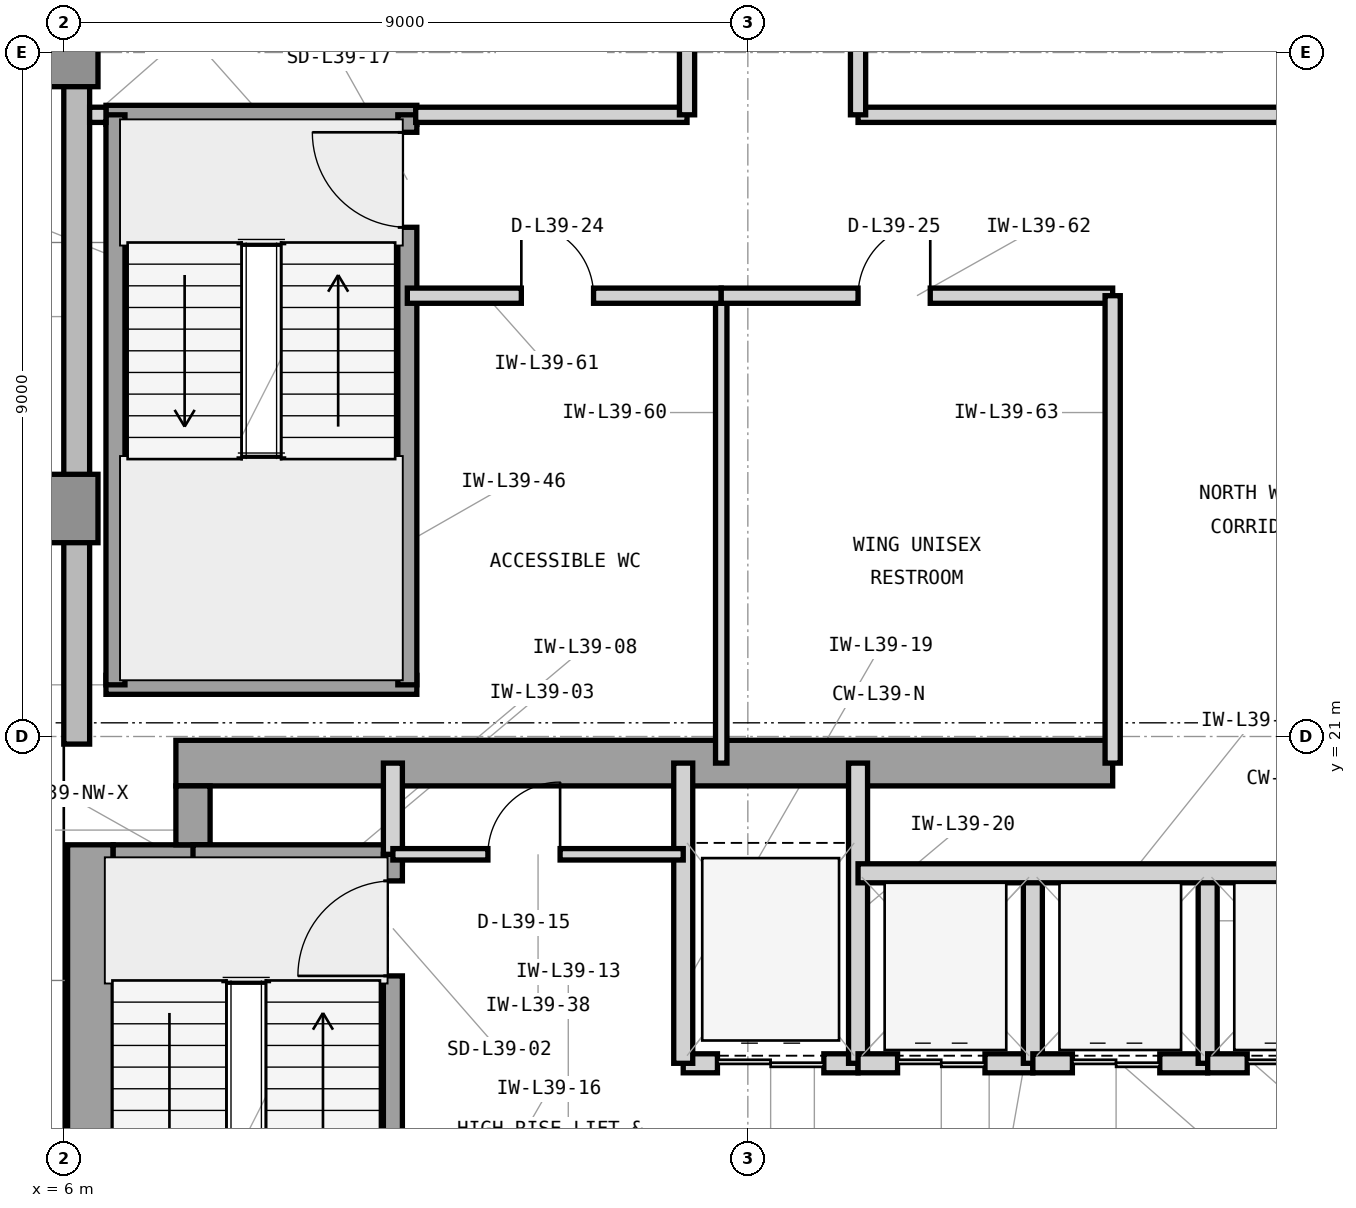
"""IFC4 building model, lengths in metres.
Left out: names, types, materials, properties, quantities, classifications, styles, units other than length and angle.
Written with IfcOpenShell. Run it as: python <this file> out.ifc"""

import sys

from ifc_helpers import new_model, si_unit, direction, frame, frame_2d, origin, origin_2d, place, context, subcontext, project, spatial, rectangle, extrude, element, fill, save


model = new_model("IFC4")
c1 = context("Model", 3, precision=1e-05, world=origin(), true_north=direction((0.0, 1.0)))
c2 = subcontext(c1, "Body", "Model", "MODEL_VIEW")
j1 = project(units=[si_unit("LENGTHUNIT", "METRE"), si_unit("PLANEANGLEUNIT", "RADIAN")], contexts=[c1])
p1 = place(None, origin())
s1 = spatial("IfcSite", under=j1, at=p1, CompositionType="ELEMENT")
p2 = place(p1, origin())
s2 = spatial("IfcBuilding", under=s1, at=p2, CompositionType="ELEMENT")
p3 = place(p2, frame((0.0, 0.0, 164.4)))
s3 = spatial("IfcBuildingStorey", under=s2, at=p3, CompositionType="ELEMENT", Elevation=164.4)
p4 = place(p3, frame((6.35, 4.425, 0.0), z_axis=(0.0, 0.0, 1.0), x_axis=(0.0, 1.0, 0.0)))
e1 = element("IfcWall", 1, at=p4, inside=s3, PredefinedType="SHEAR", context=c2, shape_type="SweptSolid", body=[
    extrude(rectangle(XDim=15.15, YDim=0.6, at=frame_2d((7.575, 0.0))), origin(), (0.0, 0.0, 1.0), 3.9),
])
p5 = place(p3, frame((7.475, 20.65, 0.0), z_axis=(0.0, 0.0, 1.0), x_axis=(1.0, 0.0, 0.0)))
e2 = element("IfcWall", 2, at=p5, inside=s3, PredefinedType="SHEAR", context=c2, shape_type="SweptSolid", body=[
    extrude(rectangle(XDim=12.325, YDim=0.6, at=frame_2d((6.163, 0.0))), origin(), (0.0, 0.0, 1.0), 3.9),
])
p6 = place(p3, frame((6.65, 19.35, 0.0), z_axis=(0.0, 0.0, 1.0), x_axis=(1.0, 0.0, 0.0)))
e3 = element("IfcWall", 3, at=p6, inside=s3, PredefinedType="SHEAR", context=c2, shape_type="SweptSolid", body=[
    extrude(rectangle(XDim=1.275, YDim=0.45, at=frame_2d((0.638, 0.0))), origin(), (0.0, 0.0, 1.0), 3.9),
])
p7 = place(p3, frame((7.7, 19.575, 0.0), z_axis=(0.0, 0.0, 1.0), x_axis=(0.0, 1.0, 0.0)))
e4 = element("IfcWall", 4, at=p7, inside=s3, PredefinedType="SHEAR", context=c2, shape_type="SweptSolid", body=[
    extrude(rectangle(XDim=0.775, YDim=0.45, at=frame_2d((0.388, 0.0))), origin(), (0.0, 0.0, 1.0), 3.9),
])
for number, where, z_axis, x_axis in (
    (5, (6.0, 24.0, 0.0), (0.0, 0.0, 1.0), (1.0, 0.0, 0.0)),
    (6, (6.0, 30.0, 0.0), (0.0, 0.0, 1.0), (1.0, 0.0, 0.0)),
):
    element("IfcColumn", number, at=place(p3, frame(where, z_axis=z_axis, x_axis=x_axis)), inside=s3, PredefinedType="COLUMN", context=c2, shape_type="SweptSolid", body=[
        extrude(rectangle(XDim=0.9, YDim=0.9, at=origin_2d()), origin(), (0.0, 0.0, 1.0), 3.9),
    ])
p8 = place(p3, frame((6.17, 43.4, 0.0), z_axis=(0.0, 0.0, 1.0), x_axis=(0.0, -1.0, 0.0)))
e7 = element("IfcWall", 7, at=p8, inside=s3, PredefinedType="STANDARD", context=c2, shape_type="SweptSolid", body=[
    extrude(rectangle(XDim=22.5, YDim=0.34, at=frame_2d((11.25, 0.0))), origin(), (0.0, 0.0, 1.0), 3.7),
])
p9 = place(p8, frame((10.1, 0.0, 0.9)))
e8 = element("IfcOpeningElement", 8, at=p9, cuts=e7, PredefinedType="OPENING", context=c2, shape_type="SweptSolid", body=[
    extrude(rectangle(XDim=2.3, YDim=2.2, at=frame_2d((1.15, 1.1))), frame((0.0, 0.18, 0.0), z_axis=(0.0, -1.0, 0.0), x_axis=(1.0, 0.0, 0.0)), (0.0, 0.0, 1.0), 0.36),
])
p10 = place(p3, frame((7.7, 19.45, 0.0), z_axis=(0.0, 0.0, 1.0), x_axis=(1.0, 0.0, 0.0)))
e9 = element("IfcWall", 9, at=p10, inside=s3, PredefinedType="SHEAR", context=c2, shape_type="SweptSolid", body=[
    extrude(rectangle(XDim=2.755, YDim=0.25, at=frame_2d((1.377, 0.0))), origin(), (0.0, 0.0, 1.0), 3.9),
])
p11 = place(p3, frame((10.33, 12.0, 0.0), z_axis=(0.0, 0.0, 1.0), x_axis=(0.0, 1.0, 0.0)))
e10 = element("IfcWall", 10, at=p11, inside=s3, PredefinedType="SHEAR", context=c2, shape_type="SweptSolid", body=[
    extrude(rectangle(XDim=7.45, YDim=0.25, at=frame_2d((3.725, 0.0))), origin(), (0.0, 0.0, 1.0), 3.9),
])
p12 = place(p11, frame((5.85, 0.0, 0.0)))
e11 = element("IfcOpeningElement", 11, at=p12, cuts=e10, PredefinedType="OPENING", context=c2, shape_type="SweptSolid", body=[
    extrude(rectangle(XDim=1.25, YDim=2.2, at=frame_2d((0.625, 1.1))), frame((0.0, 0.135, 0.0), z_axis=(0.0, -1.0, 0.0), x_axis=(1.0, 0.0, 0.0)), (0.0, 0.0, 1.0), 0.27),
])
p13 = place(p3, frame((10.33, 19.45, 0.0), z_axis=(0.0, 0.0, 1.0), x_axis=(0.0, 1.0, 0.0)))
e12 = element("IfcWall", 12, at=p13, inside=s3, PredefinedType="PARTITIONING", context=c2, shape_type="SweptSolid", body=[
    extrude(rectangle(XDim=1.2, YDim=0.25, at=frame_2d((0.6, 0.0))), origin(), (0.0, 0.0, 1.0), 3.073),
])
p14 = place(p3, frame((14.15, 16.7, 0.0), z_axis=(0.0, 0.0, 1.0), x_axis=(1.0, 0.0, 0.0)))
e13 = element("IfcWall", 13, at=p14, inside=s3, PredefinedType="PARTITIONING", context=c2, shape_type="SweptSolid", body=[
    extrude(rectangle(XDim=2.3, YDim=0.25, at=frame_2d((1.15, 0.0))), origin(), (0.0, 0.0, 1.0), 3.283),
])
p15 = place(p14, frame((0.45, 0.0, 0.0)))
e14 = element("IfcOpeningElement", 14, at=p15, cuts=e13, PredefinedType="OPENING", context=c2, shape_type="SweptSolid", body=[
    extrude(rectangle(XDim=1.4, YDim=2.35, at=frame_2d((0.7, 1.175))), frame((0.0, 0.135, 0.0), z_axis=(0.0, -1.0, 0.0), x_axis=(1.0, 0.0, 0.0)), (0.0, 0.0, 1.0), 0.27),
])
for number, where, z_axis, x_axis in (
    (15, (14.15, 16.7, 0.0), (0.0, 0.0, 1.0), (0.0, 1.0, 0.0)),
    (16, (16.45, 16.7, 0.0), (0.0, 0.0, 1.0), (0.0, 1.0, 0.0)),
):
    element("IfcWall", number, at=place(p3, frame(where, z_axis=z_axis, x_axis=x_axis)), inside=s3, PredefinedType="PARTITIONING", context=c2, shape_type="SweptSolid", body=[
        extrude(rectangle(XDim=3.95, YDim=0.25, at=frame_2d((1.975, 0.0))), origin(), (0.0, 0.0, 1.0), 3.69),
    ])
p16 = place(p3, frame((16.45, 16.7, 0.0), z_axis=(0.0, 0.0, 1.0), x_axis=(1.0, 0.0, 0.0)))
e17 = element("IfcWall", 17, at=p16, inside=s3, PredefinedType="PARTITIONING", context=c2, shape_type="SweptSolid", body=[
    extrude(rectangle(XDim=2.3, YDim=0.25, at=frame_2d((1.15, 0.0))), origin(), (0.0, 0.0, 1.0), 3.283),
])
p17 = place(p16, frame((0.52, 0.0, 0.0)))
e18 = element("IfcOpeningElement", 18, at=p17, cuts=e17, PredefinedType="OPENING", context=c2, shape_type="SweptSolid", body=[
    extrude(rectangle(XDim=1.15, YDim=2.25, at=frame_2d((0.575, 1.125))), frame((0.0, 0.135, 0.0), z_axis=(0.0, -1.0, 0.0), x_axis=(1.0, 0.0, 0.0)), (0.0, 0.0, 1.0), 0.27),
])
p18 = place(p3, frame((18.75, 16.7, 0.0), z_axis=(0.0, 0.0, 1.0), x_axis=(0.0, 1.0, 0.0)))
e19 = element("IfcWall", 19, at=p18, inside=s3, PredefinedType="PARTITIONING", context=c2, shape_type="SweptSolid", body=[
    extrude(rectangle(XDim=2.5, YDim=0.25, at=frame_2d((1.25, 0.0))), origin(), (0.0, 0.0, 1.0), 3.69),
])
p19 = place(p3, frame((18.75, 16.7, 0.0), z_axis=(0.0, 0.0, 1.0), x_axis=(1.0, 0.0, 0.0)))
e20 = element("IfcWall", 20, at=p19, inside=s3, PredefinedType="PARTITIONING", context=c2, shape_type="SweptSolid", body=[
    extrude(rectangle(XDim=2.3, YDim=0.25, at=frame_2d((1.15, 0.0))), origin(), (0.0, 0.0, 1.0), 3.283),
])
p20 = place(p19, frame((0.52, 0.0, 0.0)))
e21 = element("IfcOpeningElement", 21, at=p20, cuts=e20, PredefinedType="OPENING", context=c2, shape_type="SweptSolid", body=[
    extrude(rectangle(XDim=1.15, YDim=2.25, at=frame_2d((0.575, 1.125))), frame((0.0, 0.135, 0.0), z_axis=(0.0, -1.0, 0.0), x_axis=(1.0, 0.0, 0.0)), (0.0, 0.0, 1.0), 0.27),
])
p21 = place(p3, frame((21.05, 16.7, 0.0), z_axis=(0.0, 0.0, 1.0), x_axis=(0.0, 1.0, 0.0)))
e22 = element("IfcWall", 22, at=p21, inside=s3, PredefinedType="PARTITIONING", context=c2, shape_type="SweptSolid", body=[
    extrude(rectangle(XDim=2.5, YDim=0.25, at=frame_2d((1.25, 0.0))), origin(), (0.0, 0.0, 1.0), 3.69),
])
p22 = place(p3, frame((21.05, 16.7, 0.0), z_axis=(0.0, 0.0, 1.0), x_axis=(1.0, 0.0, 0.0)))
e23 = element("IfcWall", 23, at=p22, inside=s3, PredefinedType="PARTITIONING", context=c2, shape_type="SweptSolid", body=[
    extrude(rectangle(XDim=2.4, YDim=0.25, at=frame_2d((1.2, 0.0))), origin(), (0.0, 0.0, 1.0), 3.283),
])
p23 = place(p22, frame((0.52, 0.0, 0.0)))
e24 = element("IfcOpeningElement", 24, at=p23, cuts=e23, PredefinedType="OPENING", context=c2, shape_type="SweptSolid", body=[
    extrude(rectangle(XDim=1.15, YDim=2.25, at=frame_2d((0.575, 1.125))), frame((0.0, 0.135, 0.0), z_axis=(0.0, -1.0, 0.0), x_axis=(1.0, 0.0, 0.0)), (0.0, 0.0, 1.0), 0.27),
])
p24 = place(p3, frame((16.45, 19.2, 0.0), z_axis=(0.0, 0.0, 1.0), x_axis=(1.0, 0.0, 0.0)))
e25 = element("IfcWall", 25, at=p24, inside=s3, PredefinedType="PARTITIONING", context=c2, shape_type="SweptSolid", body=[
    extrude(rectangle(XDim=7.2, YDim=0.25, at=frame_2d((3.6, 0.0))), origin(), (0.0, 0.0, 1.0), 3.69),
])
p25 = place(p3, frame((10.33, 19.45, 0.0), z_axis=(0.0, 0.0, 1.0), x_axis=(1.0, 0.0, 0.0)))
e26 = element("IfcWall", 26, at=p25, inside=s3, PredefinedType="PARTITIONING", context=c2, shape_type="SweptSolid", body=[
    extrude(rectangle(XDim=3.82, YDim=0.15, at=frame_2d((1.91, 0.0))), origin(), (0.0, 0.0, 1.0), 3.69),
])
p26 = place(p25, frame((1.25, 0.0, 0.0)))
e27 = element("IfcOpeningElement", 27, at=p26, cuts=e26, PredefinedType="OPENING", context=c2, shape_type="SweptSolid", body=[
    extrude(rectangle(XDim=0.95, YDim=2.1, at=frame_2d((0.475, 1.05))), frame((0.0, 0.085, 0.0), z_axis=(0.0, -1.0, 0.0), x_axis=(1.0, 0.0, 0.0)), (0.0, 0.0, 1.0), 0.17),
])
for number, where, z_axis, x_axis in (
    (28, (6.555, 21.68, 0.0), (0.0, 0.0, 1.0), (1.0, 0.0, 0.0)),
    (29, (6.555, 29.18, 0.0), (0.0, 0.0, 1.0), (1.0, 0.0, 0.0)),
):
    element("IfcWall", number, at=place(p3, frame(where, z_axis=z_axis, x_axis=x_axis)), inside=s3, PredefinedType="SHEAR", context=c2, shape_type="SweptSolid", body=[
        extrude(rectangle(XDim=4.09, YDim=0.25, at=frame_2d((2.045, 0.0))), origin(), (0.0, 0.0, 1.0), 3.9),
    ])
p27 = place(p3, frame((6.68, 21.68, 0.0), z_axis=(0.0, 0.0, 1.0), x_axis=(0.0, 1.0, 0.0)))
e30 = element("IfcWall", 30, at=p27, inside=s3, PredefinedType="SHEAR", context=c2, shape_type="SweptSolid", body=[
    extrude(rectangle(XDim=7.5, YDim=0.25, at=frame_2d((3.75, 0.0))), origin(), (0.0, 0.0, 1.0), 3.9),
])
p28 = place(p3, frame((10.52, 21.68, 0.0), z_axis=(0.0, 0.0, 1.0), x_axis=(0.0, 1.0, 0.0)))
e31 = element("IfcWall", 31, at=p28, inside=s3, PredefinedType="SHEAR", context=c2, shape_type="SweptSolid", body=[
    extrude(rectangle(XDim=7.5, YDim=0.25, at=frame_2d((3.75, 0.0))), origin(), (0.0, 0.0, 1.0), 3.9),
])
p29 = place(p28, frame((6.02, 0.0, 0.0)))
e32 = element("IfcOpeningElement", 32, at=p29, cuts=e31, PredefinedType="OPENING", context=c2, shape_type="SweptSolid", body=[
    extrude(rectangle(XDim=1.25, YDim=2.2, at=frame_2d((0.625, 1.1))), frame((0.0, 0.135, 0.0), z_axis=(0.0, -1.0, 0.0), x_axis=(1.0, 0.0, 0.0)), (0.0, 0.0, 1.0), 0.27),
])
p30 = place(p3, frame((14.65, 20.65, 0.0), z_axis=(0.0, 0.0, 1.0), x_axis=(0.0, 1.0, 0.0)))
e33 = element("IfcWall", 33, at=p30, inside=s3, PredefinedType="PARTITIONING", context=c2, shape_type="SweptSolid", body=[
    extrude(rectangle(XDim=6.15, YDim=0.15, at=frame_2d((3.075, 0.0))), origin(), (0.0, 0.0, 1.0), 3.69),
])
p31 = place(p3, frame((10.52, 26.8, 0.0), z_axis=(0.0, 0.0, 1.0), x_axis=(1.0, 0.0, 0.0)))
e34 = element("IfcWall", 34, at=p31, inside=s3, PredefinedType="PARTITIONING", context=c2, shape_type="SweptSolid", body=[
    extrude(rectangle(XDim=4.13, YDim=0.2, at=frame_2d((2.065, 0.0))), origin(), (0.0, 0.0, 1.0), 3.69),
])
p32 = place(p31, frame((1.5, 0.0, 0.0)))
e35 = element("IfcOpeningElement", 35, at=p32, cuts=e34, PredefinedType="OPENING", context=c2, shape_type="SweptSolid", body=[
    extrude(rectangle(XDim=0.95, YDim=2.1, at=frame_2d((0.475, 1.05))), frame((0.0, 0.11, 0.0), z_axis=(0.0, -1.0, 0.0), x_axis=(1.0, 0.0, 0.0)), (0.0, 0.0, 1.0), 0.22),
])
p33 = place(p3, frame((14.65, 26.8, 0.0), z_axis=(0.0, 0.0, 1.0), x_axis=(1.0, 0.0, 0.0)))
e36 = element("IfcWall", 36, at=p33, inside=s3, PredefinedType="PARTITIONING", context=c2, shape_type="SweptSolid", body=[
    extrude(rectangle(XDim=5.15, YDim=0.2, at=frame_2d((2.575, 0.0))), origin(), (0.0, 0.0, 1.0), 3.69),
])
p34 = place(p33, frame((1.8, 0.0, 0.0)))
e37 = element("IfcOpeningElement", 37, at=p34, cuts=e36, PredefinedType="OPENING", context=c2, shape_type="SweptSolid", body=[
    extrude(rectangle(XDim=0.95, YDim=2.1, at=frame_2d((0.475, 1.05))), frame((0.0, 0.11, 0.0), z_axis=(0.0, -1.0, 0.0), x_axis=(1.0, 0.0, 0.0)), (0.0, 0.0, 1.0), 0.22),
])
p35 = place(p3, frame((19.8, 20.65, 0.0), z_axis=(0.0, 0.0, 1.0), x_axis=(0.0, 1.0, 0.0)))
e38 = element("IfcWall", 38, at=p35, inside=s3, PredefinedType="PARTITIONING", context=c2, shape_type="SweptSolid", body=[
    extrude(rectangle(XDim=6.15, YDim=0.2, at=frame_2d((3.075, 0.0))), origin(), (0.0, 0.0, 1.0), 3.69),
])
p36 = place(p3, frame((6.34, 29.18, 0.0), z_axis=(0.0, 0.0, 1.0), x_axis=(1.0, 0.0, 0.0)))
e39 = element("IfcWall", 39, at=p36, inside=s3, PredefinedType="PARTITIONING", context=c2, shape_type="SweptSolid", body=[
    extrude(rectangle(XDim=0.215, YDim=0.2, at=frame_2d((0.107, 0.0))), origin(), (0.0, 0.0, 1.0), 3.69),
])
p37 = place(p3, frame((10.63, 29.18, 0.0), z_axis=(0.0, 0.0, 1.0), x_axis=(1.0, 0.0, 0.0)))
e40 = element("IfcWall", 40, at=p37, inside=s3, PredefinedType="PARTITIONING", context=c2, shape_type="SweptSolid", body=[
    extrude(rectangle(XDim=3.57, YDim=0.2, at=frame_2d((1.785, 0.0))), origin(), (0.0, 0.0, 1.0), 3.69),
])
p38 = place(p3, frame((16.45, 29.18, 0.0), z_axis=(0.0, 0.0, 1.0), x_axis=(1.0, 0.0, 0.0)))
e41 = element("IfcWall", 41, at=p38, inside=s3, PredefinedType="PARTITIONING", context=c2, shape_type="SweptSolid", body=[
    extrude(rectangle(XDim=7.37, YDim=0.2, at=frame_2d((3.685, 0.0))), origin(), (0.0, 0.0, 1.0), 3.69),
])
p39 = place(p3, frame((14.2, 29.18, 0.0), z_axis=(0.0, 0.0, 1.0), x_axis=(0.0, 1.0, 0.0)))
e42 = element("IfcWall", 42, at=p39, inside=s3, PredefinedType="PARTITIONING", context=c2, shape_type="SweptSolid", body=[
    extrude(rectangle(XDim=8.32, YDim=0.2, at=frame_2d((4.16, 0.0))), origin(), (0.0, 0.0, 1.0), 3.69),
])
p40 = place(p39, frame((3.66, 0.0, 0.0)))
e43 = element("IfcOpeningElement", 43, at=p40, cuts=e42, PredefinedType="OPENING", context=c2, shape_type="SweptSolid", body=[
    extrude(rectangle(XDim=1.0, YDim=2.15, at=frame_2d((0.5, 1.075))), frame((0.0, 0.11, 0.0), z_axis=(0.0, -1.0, 0.0), x_axis=(1.0, 0.0, 0.0)), (0.0, 0.0, 1.0), 0.22),
])
p41 = place(p3, frame((16.45, 29.18, 0.0), z_axis=(0.0, 0.0, 1.0), x_axis=(0.0, 1.0, 0.0)))
e44 = element("IfcWall", 44, at=p41, inside=s3, PredefinedType="PARTITIONING", context=c2, shape_type="SweptSolid", body=[
    extrude(rectangle(XDim=8.32, YDim=0.2, at=frame_2d((4.16, 0.0))), origin(), (0.0, 0.0, 1.0), 3.69),
])
p42 = place(p41, frame((3.66, 0.0, 0.0)))
e45 = element("IfcOpeningElement", 45, at=p42, cuts=e44, PredefinedType="OPENING", context=c2, shape_type="SweptSolid", body=[
    extrude(rectangle(XDim=1.0, YDim=2.15, at=frame_2d((0.5, 1.075))), frame((0.0, 0.11, 0.0), z_axis=(0.0, -1.0, 0.0), x_axis=(1.0, 0.0, 0.0)), (0.0, 0.0, 1.0), 0.22),
])
p43 = place(p12, origin())
e46 = element("IfcDoor", 46, at=p43, inside=s3, OperationType="SINGLE_SWING_LEFT", PredefinedType="DOOR", context=c2, shape_type="SweptSolid", body=[
    extrude(rectangle(XDim=1.25, YDim=2.2, at=frame_2d((0.625, 1.1))), frame((0.0, 0.025, 0.0), z_axis=(0.0, -1.0, 0.0), x_axis=(1.0, 0.0, 0.0)), (0.0, 0.0, 1.0), 0.05),
])
fill(e11, e46)
p44 = place(p15, origin())
e47 = element("IfcDoor", 47, at=p44, inside=s3, OperationType="DOUBLE_DOOR_SLIDING", PredefinedType="DOOR", context=c2, shape_type="SweptSolid", body=[
    extrude(rectangle(XDim=1.4, YDim=2.35, at=frame_2d((0.7, 1.175))), frame((0.0, 0.025, 0.0), z_axis=(0.0, -1.0, 0.0), x_axis=(1.0, 0.0, 0.0)), (0.0, 0.0, 1.0), 0.05),
])
fill(e14, e47)
p45 = place(p17, origin())
e48 = element("IfcDoor", 48, at=p45, inside=s3, OperationType="DOUBLE_DOOR_SLIDING", PredefinedType="DOOR", context=c2, shape_type="SweptSolid", body=[
    extrude(rectangle(XDim=1.15, YDim=2.25, at=frame_2d((0.575, 1.125))), frame((0.0, 0.025, 0.0), z_axis=(0.0, -1.0, 0.0), x_axis=(1.0, 0.0, 0.0)), (0.0, 0.0, 1.0), 0.05),
])
fill(e18, e48)
p46 = place(p20, origin())
e49 = element("IfcDoor", 49, at=p46, inside=s3, OperationType="DOUBLE_DOOR_SLIDING", PredefinedType="DOOR", context=c2, shape_type="SweptSolid", body=[
    extrude(rectangle(XDim=1.15, YDim=2.25, at=frame_2d((0.575, 1.125))), frame((0.0, 0.025, 0.0), z_axis=(0.0, -1.0, 0.0), x_axis=(1.0, 0.0, 0.0)), (0.0, 0.0, 1.0), 0.05),
])
fill(e21, e49)
p47 = place(p23, origin())
e50 = element("IfcDoor", 50, at=p47, inside=s3, OperationType="DOUBLE_DOOR_SLIDING", PredefinedType="DOOR", context=c2, shape_type="SweptSolid", body=[
    extrude(rectangle(XDim=1.15, YDim=2.25, at=frame_2d((0.575, 1.125))), frame((0.0, 0.025, 0.0), z_axis=(0.0, -1.0, 0.0), x_axis=(1.0, 0.0, 0.0)), (0.0, 0.0, 1.0), 0.05),
])
fill(e24, e50)
p48 = place(p26, origin())
e51 = element("IfcDoor", 51, at=p48, inside=s3, OperationType="SINGLE_SWING_RIGHT", PredefinedType="DOOR", context=c2, shape_type="SweptSolid", body=[
    extrude(rectangle(XDim=0.95, YDim=2.1, at=frame_2d((0.475, 1.05))), frame((0.0, 0.025, 0.0), z_axis=(0.0, -1.0, 0.0), x_axis=(1.0, 0.0, 0.0)), (0.0, 0.0, 1.0), 0.05),
])
fill(e27, e51)
p49 = place(p29, origin())
e52 = element("IfcDoor", 52, at=p49, inside=s3, OperationType="SINGLE_SWING_RIGHT", PredefinedType="DOOR", context=c2, shape_type="SweptSolid", body=[
    extrude(rectangle(XDim=1.25, YDim=2.2, at=frame_2d((0.625, 1.1))), frame((0.0, 0.025, 0.0), z_axis=(0.0, -1.0, 0.0), x_axis=(1.0, 0.0, 0.0)), (0.0, 0.0, 1.0), 0.05),
])
fill(e32, e52)
p50 = place(p32, origin())
e53 = element("IfcDoor", 53, at=p50, inside=s3, OperationType="SINGLE_SWING_LEFT", PredefinedType="DOOR", context=c2, shape_type="SweptSolid", body=[
    extrude(rectangle(XDim=0.95, YDim=2.1, at=frame_2d((0.475, 1.05))), frame((0.0, 0.025, 0.0), z_axis=(0.0, -1.0, 0.0), x_axis=(1.0, 0.0, 0.0)), (0.0, 0.0, 1.0), 0.05),
])
fill(e35, e53)
p51 = place(p34, origin())
e54 = element("IfcDoor", 54, at=p51, inside=s3, OperationType="SINGLE_SWING_RIGHT", PredefinedType="DOOR", context=c2, shape_type="SweptSolid", body=[
    extrude(rectangle(XDim=0.95, YDim=2.1, at=frame_2d((0.475, 1.05))), frame((0.0, 0.025, 0.0), z_axis=(0.0, -1.0, 0.0), x_axis=(1.0, 0.0, 0.0)), (0.0, 0.0, 1.0), 0.05),
])
fill(e37, e54)
save(model, sys.argv[1])
